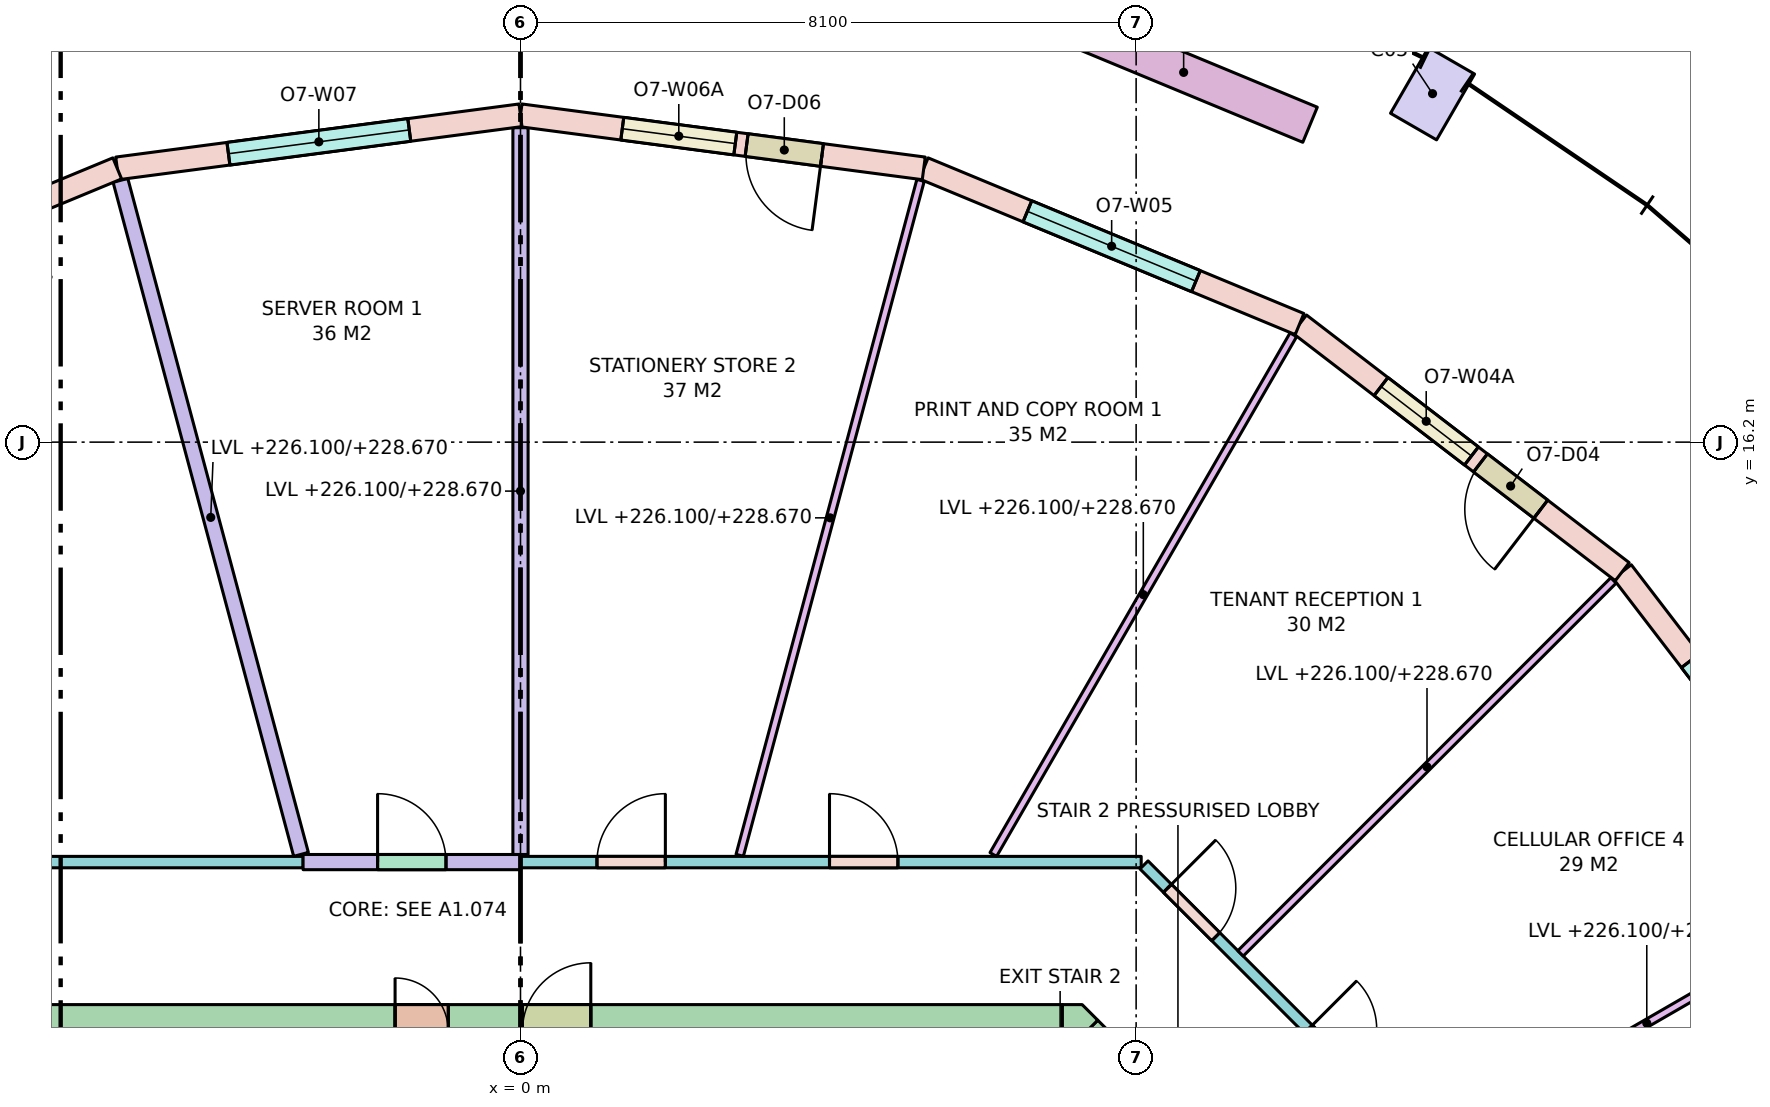
"""IFC4 building model, lengths in metres.
Left out: names, types, materials, properties, quantities, classifications, styles, units other than length and angle.
Written with IfcOpenShell. Run it as: python <this file> out.ifc"""

import sys

from ifc_helpers import new_model, si_unit, direction, frame, frame_2d, origin, origin_2d, place, context, subcontext, project, spatial, polyline, rectangle, outline, extrude, element, fill, save


model = new_model("IFC4")
c1 = context("Model", 3, precision=1e-05, world=origin(), true_north=direction((0.0, 1.0)))
c2 = subcontext(c1, "Body", "Model", "MODEL_VIEW")
j1 = project(units=[si_unit("LENGTHUNIT", "METRE"), si_unit("PLANEANGLEUNIT", "RADIAN")], contexts=[c1])
p1 = place(None, origin())
s1 = spatial("IfcSite", under=j1, at=p1, CompositionType="ELEMENT")
p2 = place(p1, origin())
s2 = spatial("IfcBuilding", under=s1, at=p2, CompositionType="ELEMENT")
p3 = place(p2, frame((0.0, 0.0, 226.1)))
s3 = spatial("IfcBuildingStorey", under=s2, at=p3, CompositionType="ELEMENT", Elevation=226.1)
p4 = place(p3, frame((12.0, 20.785, 0.0), z_axis=(0.0, 0.0, 1.0), x_axis=(-0.866025403784, 0.5, 0.0)))
e1 = element("IfcColumn", 1, at=p4, inside=s3, PredefinedType="COLUMN", context=c2, shape_type="SweptSolid", body=[
    extrude(rectangle(XDim=0.7, YDim=1.0, at=origin_2d()), origin(), (0.0, 0.0, 1.0), 3.7),
])
p5 = place(p3, frame((-7.13, 8.45, -0.28), z_axis=(0.0, 0.0, 1.0), x_axis=(1.0, 0.0, 0.0)))
e2 = element("IfcWall", 2, at=p5, inside=s3, PredefinedType="SHEAR", context=c2, shape_type="SweptSolid", body=[
    extrude(rectangle(XDim=14.26, YDim=0.7, at=frame_2d((7.13, 0.0))), origin(), (0.0, 0.0, 1.0), 3.7),
])
p6 = place(p5, frame((5.48, 0.0, 0.28)))
e3 = element("IfcOpeningElement", 3, at=p6, cuts=e2, PredefinedType="OPENING", context=c2, shape_type="SweptSolid", body=[
    extrude(rectangle(XDim=0.7, YDim=2.1, at=frame_2d((0.35, 1.05))), frame((0.0, 0.36, 0.0), z_axis=(0.0, -1.0, 0.0), x_axis=(1.0, 0.0, 0.0)), (0.0, 0.0, 1.0), 0.72),
])
p7 = place(p5, frame((7.155, 0.0, 0.28)))
e4 = element("IfcOpeningElement", 4, at=p7, cuts=e2, PredefinedType="OPENING", context=c2, shape_type="SweptSolid", body=[
    extrude(rectangle(XDim=0.9, YDim=2.1, at=frame_2d((0.45, 1.05))), frame((0.0, 0.36, 0.0), z_axis=(0.0, -1.0, 0.0), x_axis=(1.0, 0.0, 0.0)), (0.0, 0.0, 1.0), 0.72),
])
p8 = place(p3, frame((7.347, 8.347, -0.28), z_axis=(0.0, 0.0, 1.0), x_axis=(0.707106781187, -0.707106781187, 0.0)))
e5 = element("IfcWall", 5, at=p8, inside=s3, PredefinedType="SHEAR", context=c2, shape_type="SweptSolid", body=[
    extrude(rectangle(XDim=4.243, YDim=0.7, at=frame_2d((2.121, 0.0))), origin(), (0.0, 0.0, 1.0), 3.7),
])
p9 = place(p8, frame((2.393, 0.0, 0.28)))
e6 = element("IfcOpeningElement", 6, at=p9, cuts=e5, PredefinedType="OPENING", context=c2, shape_type="SweptSolid", body=[
    extrude(rectangle(XDim=1.2, YDim=2.1, at=frame_2d((0.6, 1.05))), frame((0.0, 0.36, 0.0), z_axis=(0.0, -1.0, 0.0), x_axis=(1.0, 0.0, 0.0)), (0.0, 0.0, 1.0), 0.72),
])
p10 = place(p3, frame((0.0, 0.0, -0.28)))
e7 = element("IfcWall", 7, at=p10, inside=s3, PredefinedType="SHEAR", context=c2, shape_type="SweptSolid", body=[
    extrude(outline(polyline([(7.39, 8.8), (7.595, 8.595), (7.595, 8.595), (7.595, 8.595), (7.13, 8.13), (7.13, 8.8), (7.13, 8.8), (7.39, 8.8)])), origin(), (0.0, 0.0, 1.0), 3.7),
])
p11 = place(p3, frame((17.753, 10.25, 0.0), z_axis=(0.0, 0.0, 1.0), x_axis=(-0.60876670321, 0.793349293227, 0.0)))
e8 = element("IfcWall", 8, at=p11, inside=s3, PredefinedType="STANDARD", context=c2, shape_type="SweptSolid", body=[
    extrude(rectangle(XDim=5.352, YDim=0.3, at=frame_2d((2.676, 0.0))), origin(), (0.0, 0.0, 1.0), 3.42),
])
p12 = place(p11, frame((1.476, 0.0, 0.8)))
e9 = element("IfcOpeningElement", 9, at=p12, cuts=e8, PredefinedType="OPENING", context=c2, shape_type="SweptSolid", body=[
    extrude(rectangle(XDim=2.4, YDim=2.4, at=frame_2d((1.2, 1.2))), frame((0.0, 0.16, 0.0), z_axis=(0.0, -1.0, 0.0), x_axis=(1.0, 0.0, 0.0)), (0.0, 0.0, 1.0), 0.32),
])
p13 = place(p3, frame((14.496, 14.496, 0.0), z_axis=(0.0, 0.0, 1.0), x_axis=(-0.793349293227, 0.60876670321, 0.0)))
e10 = element("IfcWall", 10, at=p13, inside=s3, PredefinedType="STANDARD", context=c2, shape_type="SweptSolid", body=[
    extrude(rectangle(XDim=5.352, YDim=0.3, at=frame_2d((2.676, 0.0))), origin(), (0.0, 0.0, 1.0), 3.42),
])
p14 = place(p13, frame((1.351, 0.0, 0.0)))
e11 = element("IfcOpeningElement", 11, at=p14, cuts=e10, PredefinedType="OPENING", context=c2, shape_type="SweptSolid", body=[
    extrude(rectangle(XDim=1.0, YDim=2.4, at=frame_2d((0.5, 1.2))), frame((0.0, 0.16, 0.0), z_axis=(0.0, -1.0, 0.0), x_axis=(1.0, 0.0, 0.0)), (0.0, 0.0, 1.0), 0.32),
])
p15 = place(p13, frame((2.501, 0.0, 0.8)))
e12 = element("IfcOpeningElement", 12, at=p15, cuts=e10, PredefinedType="OPENING", context=c2, shape_type="SweptSolid", body=[
    extrude(rectangle(XDim=1.5, YDim=2.4, at=frame_2d((0.75, 1.2))), frame((0.0, 0.16, 0.0), z_axis=(0.0, -1.0, 0.0), x_axis=(1.0, 0.0, 0.0)), (0.0, 0.0, 1.0), 0.32),
])
p16 = place(p3, frame((10.25, 17.753, 0.0), z_axis=(0.0, 0.0, 1.0), x_axis=(-0.923867255172, 0.382713071139, 0.0)))
e13 = element("IfcWall", 13, at=p16, inside=s3, PredefinedType="STANDARD", context=c2, shape_type="SweptSolid", body=[
    extrude(rectangle(XDim=5.352, YDim=0.3, at=frame_2d((2.676, 0.0))), origin(), (0.0, 0.0, 1.0), 3.42),
])
p17 = place(p16, frame((1.476, 0.0, 0.8)))
e14 = element("IfcOpeningElement", 14, at=p17, cuts=e13, PredefinedType="OPENING", context=c2, shape_type="SweptSolid", body=[
    extrude(rectangle(XDim=2.4, YDim=2.4, at=frame_2d((1.2, 1.2))), frame((0.0, 0.16, 0.0), z_axis=(0.0, -1.0, 0.0), x_axis=(1.0, 0.0, 0.0)), (0.0, 0.0, 1.0), 0.32),
])
p18 = place(p3, frame((5.306, 19.802, 0.0), z_axis=(0.0, 0.0, 1.0), x_axis=(-0.991446064069, 0.130517056518, 0.0)))
e15 = element("IfcWall", 15, at=p18, inside=s3, PredefinedType="STANDARD", context=c2, shape_type="SweptSolid", body=[
    extrude(rectangle(XDim=5.352, YDim=0.3, at=frame_2d((2.676, 0.0))), origin(), (0.0, 0.0, 1.0), 3.42),
])
p19 = place(p18, frame((1.351, 0.0, 0.0)))
e16 = element("IfcOpeningElement", 16, at=p19, cuts=e15, PredefinedType="OPENING", context=c2, shape_type="SweptSolid", body=[
    extrude(rectangle(XDim=1.0, YDim=2.4, at=frame_2d((0.5, 1.2))), frame((0.0, 0.16, 0.0), z_axis=(0.0, -1.0, 0.0), x_axis=(1.0, 0.0, 0.0)), (0.0, 0.0, 1.0), 0.32),
])
p20 = place(p18, frame((2.501, 0.0, 0.8)))
e17 = element("IfcOpeningElement", 17, at=p20, cuts=e15, PredefinedType="OPENING", context=c2, shape_type="SweptSolid", body=[
    extrude(rectangle(XDim=1.5, YDim=2.4, at=frame_2d((0.75, 1.2))), frame((0.0, 0.16, 0.0), z_axis=(0.0, -1.0, 0.0), x_axis=(1.0, 0.0, 0.0)), (0.0, 0.0, 1.0), 0.32),
])
p21 = place(p3, frame((0.0, 20.5, 0.0), z_axis=(0.0, 0.0, 1.0), x_axis=(-0.991446064069, -0.130517056518, 0.0)))
e18 = element("IfcWall", 18, at=p21, inside=s3, PredefinedType="STANDARD", context=c2, shape_type="SweptSolid", body=[
    extrude(rectangle(XDim=5.352, YDim=0.3, at=frame_2d((2.676, 0.0))), origin(), (0.0, 0.0, 1.0), 3.42),
])
p22 = place(p21, frame((1.476, 0.0, 0.8)))
e19 = element("IfcOpeningElement", 19, at=p22, cuts=e18, PredefinedType="OPENING", context=c2, shape_type="SweptSolid", body=[
    extrude(rectangle(XDim=2.4, YDim=2.4, at=frame_2d((1.2, 1.2))), frame((0.0, 0.16, 0.0), z_axis=(0.0, -1.0, 0.0), x_axis=(1.0, 0.0, 0.0)), (0.0, 0.0, 1.0), 0.32),
])
p23 = place(p3, frame((-5.306, 19.802, 0.0), z_axis=(0.0, 0.0, 1.0), x_axis=(-0.923867255172, -0.382713071139, 0.0)))
e20 = element("IfcWall", 20, at=p23, inside=s3, PredefinedType="STANDARD", context=c2, shape_type="SweptSolid", body=[
    extrude(rectangle(XDim=5.352, YDim=0.3, at=frame_2d((2.676, 0.0))), origin(), (0.0, 0.0, 1.0), 3.42),
])
p24 = place(p23, frame((1.351, 0.0, 0.0)))
e21 = element("IfcOpeningElement", 21, at=p24, cuts=e20, PredefinedType="OPENING", context=c2, shape_type="SweptSolid", body=[
    extrude(rectangle(XDim=1.0, YDim=2.4, at=frame_2d((0.5, 1.2))), frame((0.0, 0.16, 0.0), z_axis=(0.0, -1.0, 0.0), x_axis=(1.0, 0.0, 0.0)), (0.0, 0.0, 1.0), 0.32),
])
p25 = place(p23, frame((2.501, 0.0, 0.8)))
e22 = element("IfcOpeningElement", 22, at=p25, cuts=e20, PredefinedType="OPENING", context=c2, shape_type="SweptSolid", body=[
    extrude(rectangle(XDim=1.5, YDim=2.4, at=frame_2d((0.75, 1.2))), frame((0.0, 0.16, 0.0), z_axis=(0.0, -1.0, 0.0), x_axis=(1.0, 0.0, 0.0)), (0.0, 0.0, 1.0), 0.32),
])
p26 = place(p3, frame((10.388, 20.375, 0.0), z_axis=(0.0, 0.0, 1.0), x_axis=(-0.923851510231, 0.38275107713, 0.0)))
e23 = element("IfcWall", 23, at=p26, inside=s3, PredefinedType="PARAPET", context=c2, shape_type="SweptSolid", body=[
    extrude(rectangle(XDim=3.6, YDim=0.5, at=frame_2d((1.8, 0.0))), origin(), (0.0, 0.0, 1.0), 0.9),
])
p27 = place(p3, frame((-8.114, 10.675, 0.0), z_axis=(0.0, 0.0, 1.0), x_axis=(1.0, 0.0, 0.0)))
e24 = element("IfcWall", 24, at=p27, inside=s3, PredefinedType="PARTITIONING", context=c2, shape_type="SweptSolid", body=[
    extrude(rectangle(XDim=5.254, YDim=0.15, at=frame_2d((2.627, 0.0))), origin(), (0.0, 0.0, 1.0), 2.57),
])
p28 = place(p3, frame((-2.86, 10.675, 0.0), z_axis=(0.0, 0.0, 1.0), x_axis=(1.0, 0.0, 0.0)))
e25 = element("IfcWall", 25, at=p28, inside=s3, PredefinedType="PARTITIONING", context=c2, shape_type="SweptSolid", body=[
    extrude(rectangle(XDim=2.86, YDim=0.2, at=frame_2d((1.43, 0.0))), origin(), (0.0, 0.0, 1.0), 2.57),
])
p29 = place(p28, frame((0.98, 0.0, 0.0)))
e26 = element("IfcOpeningElement", 26, at=p29, cuts=e25, PredefinedType="OPENING", context=c2, shape_type="SweptSolid", body=[
    extrude(rectangle(XDim=0.9, YDim=2.1, at=frame_2d((0.45, 1.05))), frame((0.0, 0.11, 0.0), z_axis=(0.0, -1.0, 0.0), x_axis=(1.0, 0.0, 0.0)), (0.0, 0.0, 1.0), 0.22),
])
p30 = place(p3, frame((0.0, 10.675, 0.0), z_axis=(0.0, 0.0, 1.0), x_axis=(1.0, 0.0, 0.0)))
e27 = element("IfcWall", 27, at=p30, inside=s3, PredefinedType="PARTITIONING", context=c2, shape_type="SweptSolid", body=[
    extrude(rectangle(XDim=8.167, YDim=0.15, at=frame_2d((4.083, 0.0))), origin(), (0.0, 0.0, 1.0), 2.57),
])
p31 = place(p30, frame((4.066, 0.0, 0.0)))
e28 = element("IfcOpeningElement", 28, at=p31, cuts=e27, PredefinedType="OPENING", context=c2, shape_type="SweptSolid", body=[
    extrude(rectangle(XDim=0.9, YDim=2.1, at=frame_2d((0.45, 1.05))), frame((0.0, 0.085, 0.0), z_axis=(0.0, -1.0, 0.0), x_axis=(1.0, 0.0, 0.0)), (0.0, 0.0, 1.0), 0.17),
])
p32 = place(p30, frame((1.006, 0.0, 0.0)))
e29 = element("IfcOpeningElement", 29, at=p32, cuts=e27, PredefinedType="OPENING", context=c2, shape_type="SweptSolid", body=[
    extrude(rectangle(XDim=0.9, YDim=2.1, at=frame_2d((0.45, 1.05))), frame((0.0, 0.085, 0.0), z_axis=(0.0, -1.0, 0.0), x_axis=(1.0, 0.0, 0.0)), (0.0, 0.0, 1.0), 0.17),
])
p33 = place(p3, frame((8.204, 10.638, 0.0), z_axis=(0.0, 0.0, 1.0), x_axis=(0.707106781187, -0.707106781187, 0.0)))
e30 = element("IfcWall", 30, at=p33, inside=s3, PredefinedType="PARTITIONING", context=c2, shape_type="SweptSolid", body=[
    extrude(rectangle(XDim=6.271, YDim=0.15, at=frame_2d((3.135, 0.0))), origin(), (0.0, 0.0, 1.0), 2.57),
])
p34 = place(p33, frame((3.057, 0.0, 0.0)))
e31 = element("IfcOpeningElement", 31, at=p34, cuts=e30, PredefinedType="OPENING", context=c2, shape_type="SweptSolid", body=[
    extrude(rectangle(XDim=0.9, YDim=2.1, at=frame_2d((0.45, 1.05))), frame((0.0, 0.085, 0.0), z_axis=(0.0, -1.0, 0.0), x_axis=(1.0, 0.0, 0.0)), (0.0, 0.0, 1.0), 0.17),
])
p35 = place(p33, frame((0.436, 0.0, 0.0)))
e32 = element("IfcOpeningElement", 32, at=p35, cuts=e30, PredefinedType="OPENING", context=c2, shape_type="SweptSolid", body=[
    extrude(rectangle(XDim=0.9, YDim=2.1, at=frame_2d((0.45, 1.05))), frame((0.0, 0.085, 0.0), z_axis=(0.0, -1.0, 0.0), x_axis=(1.0, 0.0, 0.0)), (0.0, 0.0, 1.0), 0.17),
])
p36 = place(p3, frame((12.025, 6.943, 0.0), z_axis=(0.0, 0.0, 1.0), x_axis=(0.866026773083, 0.499997628298, 0.0)))
e33 = element("IfcWall", 33, at=p36, inside=s3, PredefinedType="PARTITIONING", context=c2, shape_type="SweptSolid", body=[
    extrude(rectangle(XDim=6.451, YDim=0.1, at=frame_2d((3.226, 0.0))), origin(), (0.0, 0.0, 1.0), 2.57),
])
p37 = place(p3, frame((9.474, 9.474, 0.0), z_axis=(0.0, 0.0, 1.0), x_axis=(0.707106781187, 0.707106781187, 0.0)))
e34 = element("IfcWall", 34, at=p37, inside=s3, PredefinedType="PARTITIONING", context=c2, shape_type="SweptSolid", body=[
    extrude(rectangle(XDim=6.938, YDim=0.1, at=frame_2d((3.469, 0.0))), origin(), (0.0, 0.0, 1.0), 2.57),
])
p38 = place(p3, frame((6.221, 10.775, 0.0), z_axis=(0.0, 0.0, 1.0), x_axis=(0.500016891966, 0.866015650984, 0.0)))
e35 = element("IfcWall", 35, at=p38, inside=s3, PredefinedType="PARTITIONING", context=c2, shape_type="SweptSolid", body=[
    extrude(rectangle(XDim=7.895, YDim=0.1, at=frame_2d((3.948, 0.0))), origin(), (0.0, 0.0, 1.0), 2.57),
])
p39 = place(p3, frame((2.884, 10.764, 0.0), z_axis=(0.0, 0.0, 1.0), x_axis=(0.258811310764, 0.965927898666, 0.0)))
e36 = element("IfcWall", 36, at=p39, inside=s3, PredefinedType="PARTITIONING", context=c2, shape_type="SweptSolid", body=[
    extrude(rectangle(XDim=9.193, YDim=0.1, at=frame_2d((4.596, 0.0))), origin(), (0.0, 0.0, 1.0), 2.57),
])
p40 = place(p3, frame((0.0, 10.775, 0.0), z_axis=(0.0, 0.0, 1.0), x_axis=(0.0, 1.0, 0.0)))
e37 = element("IfcWall", 37, at=p40, inside=s3, PredefinedType="PARTITIONING", context=c2, shape_type="SweptSolid", body=[
    extrude(rectangle(XDim=9.562, YDim=0.2, at=frame_2d((4.781, 0.0))), origin(), (0.0, 0.0, 1.0), 2.57),
])
p41 = place(p3, frame((-2.887, 10.776, 0.0), z_axis=(0.0, 0.0, 1.0), x_axis=(-0.258814513846, 0.965927040424, 0.0)))
e38 = element("IfcWall", 38, at=p41, inside=s3, PredefinedType="PARTITIONING", context=c2, shape_type="SweptSolid", body=[
    extrude(rectangle(XDim=9.18, YDim=0.2, at=frame_2d((4.59, 0.0))), origin(), (0.0, 0.0, 1.0), 2.57),
])
p42 = place(p12, origin())
e39 = element("IfcWindow", 39, at=p42, inside=s3, PartitioningType="SINGLE_PANEL", PredefinedType="WINDOW", context=c2, shape_type="SweptSolid", body=[
    extrude(rectangle(XDim=2.4, YDim=2.4, at=frame_2d((1.2, 1.2))), frame((0.0, 0.03, 0.0), z_axis=(0.0, -1.0, 0.0), x_axis=(1.0, 0.0, 0.0)), (0.0, 0.0, 1.0), 0.06),
])
fill(e9, e39)
p43 = place(p14, origin())
e40 = element("IfcDoor", 40, at=p43, inside=s3, OperationType="SINGLE_SWING_LEFT", PredefinedType="DOOR", context=c2, shape_type="SweptSolid", body=[
    extrude(rectangle(XDim=1.0, YDim=2.4, at=frame_2d((0.5, 1.2))), frame((0.0, 0.025, 0.0), z_axis=(0.0, -1.0, 0.0), x_axis=(1.0, 0.0, 0.0)), (0.0, 0.0, 1.0), 0.05),
])
fill(e11, e40)
p44 = place(p15, origin())
e41 = element("IfcWindow", 41, at=p44, inside=s3, PartitioningType="SINGLE_PANEL", PredefinedType="WINDOW", context=c2, shape_type="SweptSolid", body=[
    extrude(rectangle(XDim=1.5, YDim=2.4, at=frame_2d((0.75, 1.2))), frame((0.0, 0.03, 0.0), z_axis=(0.0, -1.0, 0.0), x_axis=(1.0, 0.0, 0.0)), (0.0, 0.0, 1.0), 0.06),
])
fill(e12, e41)
p45 = place(p17, origin())
e42 = element("IfcWindow", 42, at=p45, inside=s3, PartitioningType="SINGLE_PANEL", PredefinedType="WINDOW", context=c2, shape_type="SweptSolid", body=[
    extrude(rectangle(XDim=2.4, YDim=2.4, at=frame_2d((1.2, 1.2))), frame((0.0, 0.03, 0.0), z_axis=(0.0, -1.0, 0.0), x_axis=(1.0, 0.0, 0.0)), (0.0, 0.0, 1.0), 0.06),
])
fill(e14, e42)
p46 = place(p19, origin())
e43 = element("IfcDoor", 43, at=p46, inside=s3, OperationType="SINGLE_SWING_LEFT", PredefinedType="DOOR", context=c2, shape_type="SweptSolid", body=[
    extrude(rectangle(XDim=1.0, YDim=2.4, at=frame_2d((0.5, 1.2))), frame((0.0, 0.025, 0.0), z_axis=(0.0, -1.0, 0.0), x_axis=(1.0, 0.0, 0.0)), (0.0, 0.0, 1.0), 0.05),
])
fill(e16, e43)
p47 = place(p20, origin())
e44 = element("IfcWindow", 44, at=p47, inside=s3, PartitioningType="SINGLE_PANEL", PredefinedType="WINDOW", context=c2, shape_type="SweptSolid", body=[
    extrude(rectangle(XDim=1.5, YDim=2.4, at=frame_2d((0.75, 1.2))), frame((0.0, 0.03, 0.0), z_axis=(0.0, -1.0, 0.0), x_axis=(1.0, 0.0, 0.0)), (0.0, 0.0, 1.0), 0.06),
])
fill(e17, e44)
p48 = place(p22, origin())
e45 = element("IfcWindow", 45, at=p48, inside=s3, PartitioningType="SINGLE_PANEL", PredefinedType="WINDOW", context=c2, shape_type="SweptSolid", body=[
    extrude(rectangle(XDim=2.4, YDim=2.4, at=frame_2d((1.2, 1.2))), frame((0.0, 0.03, 0.0), z_axis=(0.0, -1.0, 0.0), x_axis=(1.0, 0.0, 0.0)), (0.0, 0.0, 1.0), 0.06),
])
fill(e19, e45)
p49 = place(p35, origin())
e46 = element("IfcDoor", 46, at=p49, inside=s3, OperationType="SINGLE_SWING_LEFT", PredefinedType="DOOR", context=c2, shape_type="SweptSolid", body=[
    extrude(rectangle(XDim=0.9, YDim=2.1, at=frame_2d((0.45, 1.05))), frame((0.0, 0.025, 0.0), z_axis=(0.0, -1.0, 0.0), x_axis=(1.0, 0.0, 0.0)), (0.0, 0.0, 1.0), 0.05),
])
fill(e32, e46)
p50 = place(p31, origin())
e47 = element("IfcDoor", 47, at=p50, inside=s3, OperationType="SINGLE_SWING_LEFT", PredefinedType="DOOR", context=c2, shape_type="SweptSolid", body=[
    extrude(rectangle(XDim=0.9, YDim=2.1, at=frame_2d((0.45, 1.05))), frame((0.0, 0.025, 0.0), z_axis=(0.0, -1.0, 0.0), x_axis=(1.0, 0.0, 0.0)), (0.0, 0.0, 1.0), 0.05),
])
fill(e28, e47)
p51 = place(p32, origin())
e48 = element("IfcDoor", 48, at=p51, inside=s3, OperationType="SINGLE_SWING_RIGHT", PredefinedType="DOOR", context=c2, shape_type="SweptSolid", body=[
    extrude(rectangle(XDim=0.9, YDim=2.1, at=frame_2d((0.45, 1.05))), frame((0.0, 0.025, 0.0), z_axis=(0.0, -1.0, 0.0), x_axis=(1.0, 0.0, 0.0)), (0.0, 0.0, 1.0), 0.05),
])
fill(e29, e48)
p52 = place(p29, origin())
e49 = element("IfcDoor", 49, at=p52, inside=s3, OperationType="SINGLE_SWING_LEFT", PredefinedType="DOOR", context=c2, shape_type="SweptSolid", body=[
    extrude(rectangle(XDim=0.9, YDim=2.1, at=frame_2d((0.45, 1.05))), frame((0.0, 0.025, 0.0), z_axis=(0.0, -1.0, 0.0), x_axis=(1.0, 0.0, 0.0)), (0.0, 0.0, 1.0), 0.05),
])
fill(e26, e49)
save(model, sys.argv[1])
